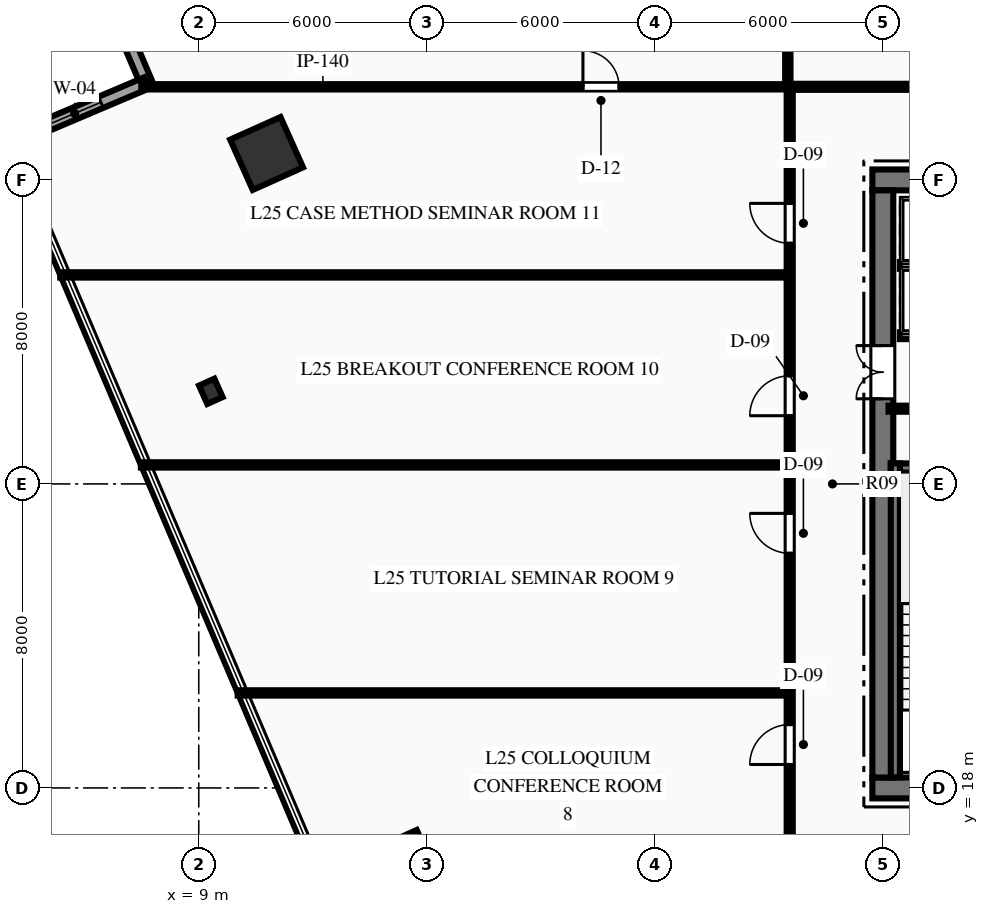
"""IFC4 building model, lengths in metres.
Left out: names, types, materials, properties, quantities, classifications, styles, units other than length and angle.
Written with IfcOpenShell. Run it as: python <this file> out.ifc"""

import sys

from ifc_helpers import new_model, si_unit, direction, frame, frame_2d, origin, origin_2d, place, context, subcontext, project, spatial, rectangle, hollow_rectangle, i_section, extrude, element, fill, save


model = new_model("IFC4")
c1 = context("Model", 3, precision=1e-05, world=origin(), true_north=direction((0.0, 1.0)))
c2 = subcontext(c1, "Body", "Model", "MODEL_VIEW")
j1 = project(units=[si_unit("LENGTHUNIT", "METRE"), si_unit("PLANEANGLEUNIT", "RADIAN")], contexts=[c1])
p1 = place(None, origin())
s1 = spatial("IfcSite", under=j1, at=p1, CompositionType="ELEMENT")
p2 = place(p1, origin())
s2 = spatial("IfcBuilding", under=s1, at=p2, CompositionType="ELEMENT")
p3 = place(p2, frame((0.0, 0.0, 105.45)))
s3 = spatial("IfcBuildingStorey", under=s2, at=p3, CompositionType="ELEMENT", Elevation=105.45)
p4 = place(p3, frame((26.725, 18.0, 0.0), z_axis=(0.0, 0.0, 1.0), x_axis=(1.0, 0.0, 0.0)))
e1 = element("IfcWall", 1, at=p4, inside=s3, PredefinedType="SHEAR", context=c2, shape_type="SweptSolid", body=[
    extrude(rectangle(XDim=18.55, YDim=0.55, at=frame_2d((9.275, 0.0))), origin(), (0.0, 0.0, 1.0), 3.75),
])
p5 = place(p4, frame((7.375, 0.0, 0.0)))
e2 = element("IfcOpeningElement", 2, at=p5, cuts=e1, PredefinedType="OPENING", context=c2, shape_type="SweptSolid", body=[
    extrude(rectangle(XDim=1.1, YDim=2.15, at=frame_2d((0.55, 1.075))), frame((0.0, 0.285, 0.0), z_axis=(0.0, -1.0, 0.0), x_axis=(1.0, 0.0, 0.0)), (0.0, 0.0, 1.0), 0.57),
])
p6 = place(p4, frame((10.075, 0.0, 0.0)))
e3 = element("IfcOpeningElement", 3, at=p6, cuts=e1, PredefinedType="OPENING", context=c2, shape_type="SweptSolid", body=[
    extrude(rectangle(XDim=1.1, YDim=2.15, at=frame_2d((0.55, 1.075))), frame((0.0, 0.285, 0.0), z_axis=(0.0, -1.0, 0.0), x_axis=(1.0, 0.0, 0.0)), (0.0, 0.0, 1.0), 0.57),
])
p7 = place(p3, frame((26.725, 34.0, 0.0), z_axis=(0.0, 0.0, 1.0), x_axis=(1.0, 0.0, 0.0)))
e4 = element("IfcWall", 4, at=p7, inside=s3, PredefinedType="SHEAR", context=c2, shape_type="SweptSolid", body=[
    extrude(rectangle(XDim=18.55, YDim=0.55, at=frame_2d((9.275, 0.0))), origin(), (0.0, 0.0, 1.0), 3.75),
])
p8 = place(p7, frame((1.24, 0.0, 0.0)))
e5 = element("IfcOpeningElement", 5, at=p8, cuts=e4, PredefinedType="OPENING", context=c2, shape_type="SweptSolid", body=[
    extrude(rectangle(XDim=1.1, YDim=2.15, at=frame_2d((0.55, 1.075))), frame((0.0, 0.285, 0.0), z_axis=(0.0, -1.0, 0.0), x_axis=(1.0, 0.0, 0.0)), (0.0, 0.0, 1.0), 0.57),
])
p9 = place(p7, frame((3.49, 0.0, 0.0)))
e6 = element("IfcOpeningElement", 6, at=p9, cuts=e4, PredefinedType="OPENING", context=c2, shape_type="SweptSolid", body=[
    extrude(rectangle(XDim=1.1, YDim=2.15, at=frame_2d((0.55, 1.075))), frame((0.0, 0.285, 0.0), z_axis=(0.0, -1.0, 0.0), x_axis=(1.0, 0.0, 0.0)), (0.0, 0.0, 1.0), 0.57),
])
p10 = place(p7, frame((13.96, 0.0, 0.0)))
e7 = element("IfcOpeningElement", 7, at=p10, cuts=e4, PredefinedType="OPENING", context=c2, shape_type="SweptSolid", body=[
    extrude(rectangle(XDim=1.1, YDim=2.15, at=frame_2d((0.55, 1.075))), frame((0.0, 0.285, 0.0), z_axis=(0.0, -1.0, 0.0), x_axis=(1.0, 0.0, 0.0)), (0.0, 0.0, 1.0), 0.57),
])
p11 = place(p7, frame((16.21, 0.0, 0.0)))
e8 = element("IfcOpeningElement", 8, at=p11, cuts=e4, PredefinedType="OPENING", context=c2, shape_type="SweptSolid", body=[
    extrude(rectangle(XDim=1.1, YDim=2.15, at=frame_2d((0.55, 1.075))), frame((0.0, 0.285, 0.0), z_axis=(0.0, -1.0, 0.0), x_axis=(1.0, 0.0, 0.0)), (0.0, 0.0, 1.0), 0.57),
])
p12 = place(p3, frame((27.0, 18.275, 0.0), z_axis=(0.0, 0.0, 1.0), x_axis=(0.0, 1.0, 0.0)))
e9 = element("IfcWall", 9, at=p12, inside=s3, PredefinedType="SHEAR", context=c2, shape_type="SweptSolid", body=[
    extrude(rectangle(XDim=15.45, YDim=0.55, at=frame_2d((7.725, 0.0))), origin(), (0.0, 0.0, 1.0), 3.75),
])
p13 = place(p12, frame((9.965, 0.0, 0.0)))
e10 = element("IfcOpeningElement", 10, at=p13, cuts=e9, PredefinedType="OPENING", context=c2, shape_type="SweptSolid", body=[
    extrude(rectangle(XDim=1.4, YDim=2.2, at=frame_2d((0.7, 1.1))), frame((0.0, 0.285, 0.0), z_axis=(0.0, -1.0, 0.0), x_axis=(1.0, 0.0, 0.0)), (0.0, 0.0, 1.0), 0.57),
])
p14 = place(p3, frame((27.21, 26.42, 0.0), z_axis=(0.0, 0.0, 1.0), x_axis=(1.0, 0.0, 0.0)))
e11 = element("IfcWall", 11, at=p14, inside=s3, PredefinedType="SHEAR", context=c2, shape_type="SweptSolid", body=[
    extrude(rectangle(XDim=3.98, YDim=0.24, at=frame_2d((1.99, 0.0))), origin(), (0.0, 0.0, 1.0), 3.75),
])
p15 = place(p3, frame((27.33, 18.28, 0.0), z_axis=(0.0, 0.0, 1.0), x_axis=(0.0, 1.0, 0.0)))
e12 = element("IfcWall", 12, at=p15, inside=s3, PredefinedType="SHEAR", context=c2, shape_type="SweptSolid", body=[
    extrude(rectangle(XDim=8.26, YDim=0.24, at=frame_2d((4.13, 0.0))), origin(), (0.0, 0.0, 1.0), 3.75),
])
p16 = place(p3, frame((10.786, 34.695, 0.0), z_axis=(0.0, 0.0, 1.0), x_axis=(0.912477494148, 0.409126902895, 0.0)))
e13 = element("IfcColumn", 13, at=p16, inside=s3, PredefinedType="COLUMN", context=c2, shape_type="SweptSolid", body=[
    extrude(hollow_rectangle(XDim=1.45, YDim=1.45, WallThickness=0.07, at=origin_2d()), origin(), (0.0, 0.0, 1.0), 3.75),
])
for number, where, z_axis, x_axis in (
    (14, (9.318, 28.437, 0.0), (0.0, 0.0, 1.0), (0.912, 0.409, 0.0)),
    (15, (14.643, 16.561, 0.0), (0.0, 0.0, 1.0), (0.912, 0.409, 0.0)),
):
    element("IfcColumn", number, at=place(p3, frame(where, z_axis=z_axis, x_axis=x_axis)), inside=s3, PredefinedType="COLUMN", context=c2, shape_type="SweptSolid", body=[
        extrude(i_section(OverallWidth=0.442, OverallDepth=0.531, WebThickness=0.066, FlangeThickness=0.106, at=origin_2d()), origin(), (0.0, 0.0, 1.0), 3.75),
    ])
p17 = place(p3, frame((7.622, 36.55, 0.0), z_axis=(0.0, 0.0, 1.0), x_axis=(-0.390682883444, 0.920525330767, 0.0)))
e16 = element("IfcWall", 16, at=p17, inside=s3, PredefinedType="STANDARD", context=c2, shape_type="SweptSolid", body=[
    extrude(rectangle(XDim=4.1, YDim=0.32, at=frame_2d((2.05, 0.0))), origin(), (0.0, 0.0, 1.0), 3.45),
])
p18 = place(p3, frame((3.848, 34.948, 0.0), z_axis=(0.0, 0.0, 1.0), x_axis=(0.920516241292, 0.390704299335, 0.0)))
e17 = element("IfcWall", 17, at=p18, inside=s3, PredefinedType="STANDARD", context=c2, shape_type="SweptSolid", body=[
    extrude(rectangle(XDim=4.1, YDim=0.32, at=frame_2d((2.05, 0.0))), origin(), (0.0, 0.0, 1.0), 3.45),
])
p19 = place(p18, frame((1.3, 0.0, 0.85)))
e18 = element("IfcOpeningElement", 18, at=p19, cuts=e17, PredefinedType="OPENING", context=c2, shape_type="SweptSolid", body=[
    extrude(rectangle(XDim=1.5, YDim=2.1, at=frame_2d((0.75, 1.05))), frame((0.0, 0.17, 0.0), z_axis=(0.0, -1.0, 0.0), x_axis=(1.0, 0.0, 0.0)), (0.0, 0.0, 1.0), 0.34),
])
p20 = place(p3, frame((27.15, 27.98, 0.0), z_axis=(0.0, 0.0, 1.0), x_axis=(1.0, 0.0, 0.0)))
e19 = element("IfcWall", 19, at=p20, inside=s3, PredefinedType="PARTITIONING", context=c2, shape_type="SweptSolid", body=[
    extrude(rectangle(XDim=4.05, YDim=0.16, at=frame_2d((2.025, 0.0))), origin(), (0.0, 0.0, 1.0), 3.45),
])
p21 = place(p20, frame((1.625, 0.0, 0.0)))
e20 = element("IfcOpeningElement", 20, at=p21, cuts=e19, PredefinedType="OPENING", context=c2, shape_type="SweptSolid", body=[
    extrude(rectangle(XDim=0.95, YDim=2.15, at=frame_2d((0.475, 1.075))), frame((0.0, 0.09, 0.0), z_axis=(0.0, -1.0, 0.0), x_axis=(1.0, 0.0, 0.0)), (0.0, 0.0, 1.0), 0.18),
])
p22 = place(p3, frame((27.45, 29.9, 0.0), z_axis=(0.0, 0.0, 1.0), x_axis=(1.0, 0.0, 0.0)))
e21 = element("IfcWall", 21, at=p22, inside=s3, PredefinedType="PARTITIONING", context=c2, shape_type="SweptSolid", body=[
    extrude(rectangle(XDim=4.43, YDim=0.18, at=frame_2d((2.215, 0.0))), origin(), (0.0, 0.0, 1.0), 3.45),
])
p23 = place(p22, frame((0.515, 0.0, 0.0)))
e22 = element("IfcOpeningElement", 22, at=p23, cuts=e21, PredefinedType="OPENING", context=c2, shape_type="SweptSolid", body=[
    extrude(rectangle(XDim=1.1, YDim=2.15, at=frame_2d((0.55, 1.075))), frame((0.0, 0.1, 0.0), z_axis=(0.0, -1.0, 0.0), x_axis=(1.0, 0.0, 0.0)), (0.0, 0.0, 1.0), 0.2),
])
p24 = place(p22, frame((2.765, 0.0, 0.0)))
e23 = element("IfcOpeningElement", 23, at=p24, cuts=e21, PredefinedType="OPENING", context=c2, shape_type="SweptSolid", body=[
    extrude(rectangle(XDim=1.1, YDim=2.15, at=frame_2d((0.55, 1.075))), frame((0.0, 0.1, 0.0), z_axis=(0.0, -1.0, 0.0), x_axis=(1.0, 0.0, 0.0)), (0.0, 0.0, 1.0), 0.2),
])
p25 = place(p3, frame((27.45, 31.75, 0.0), z_axis=(0.0, 0.0, 1.0), x_axis=(1.0, 0.0, 0.0)))
e24 = element("IfcWall", 24, at=p25, inside=s3, PredefinedType="PARTITIONING", context=c2, shape_type="SweptSolid", body=[
    extrude(rectangle(XDim=4.43, YDim=0.18, at=frame_2d((2.215, 0.0))), origin(), (0.0, 0.0, 1.0), 3.45),
])
p26 = place(p3, frame((24.5, 36.45, 0.0), z_axis=(0.0, 0.0, 1.0), x_axis=(1.0, 0.0, 0.0)))
e25 = element("IfcWall", 25, at=p26, inside=s3, PredefinedType="PARTITIONING", context=c2, shape_type="SweptSolid", body=[
    extrude(rectangle(XDim=23.0, YDim=0.16, at=frame_2d((11.5, 0.0))), origin(), (0.0, 0.0, 1.0), 3.45),
])
p27 = place(p26, frame((7.521, 0.0, 0.0)))
e26 = element("IfcOpeningElement", 26, at=p27, cuts=e25, PredefinedType="OPENING", context=c2, shape_type="SweptSolid", body=[
    extrude(rectangle(XDim=1.05, YDim=2.15, at=frame_2d((0.525, 1.075))), frame((0.0, 0.09, 0.0), z_axis=(0.0, -1.0, 0.0), x_axis=(1.0, 0.0, 0.0)), (0.0, 0.0, 1.0), 0.18),
])
p28 = place(p26, frame((14.375, 0.0, 0.0)))
e27 = element("IfcOpeningElement", 27, at=p28, cuts=e25, PredefinedType="OPENING", context=c2, shape_type="SweptSolid", body=[
    extrude(rectangle(XDim=1.05, YDim=2.15, at=frame_2d((0.525, 1.075))), frame((0.0, 0.09, 0.0), z_axis=(0.0, -1.0, 0.0), x_axis=(1.0, 0.0, 0.0)), (0.0, 0.0, 1.0), 0.18),
])
p29 = place(p3, frame((24.55, 15.55, 0.0), z_axis=(0.0, 0.0, 1.0), x_axis=(0.0, 1.0, 0.0)))
e28 = element("IfcWall", 28, at=p29, inside=s3, PredefinedType="PARTITIONING", context=c2, shape_type="SweptSolid", body=[
    extrude(rectangle(XDim=20.9, YDim=0.16, at=frame_2d((10.45, 0.0))), origin(), (0.0, 0.0, 1.0), 3.45),
])
p30 = place(p29, frame((3.067, 0.0, 0.0)))
e29 = element("IfcOpeningElement", 29, at=p30, cuts=e28, PredefinedType="OPENING", context=c2, shape_type="SweptSolid", body=[
    extrude(rectangle(XDim=1.05, YDim=2.15, at=frame_2d((0.525, 1.075))), frame((0.0, 0.09, 0.0), z_axis=(0.0, -1.0, 0.0), x_axis=(1.0, 0.0, 0.0)), (0.0, 0.0, 1.0), 0.18),
])
p31 = place(p29, frame((8.625, 0.0, 0.0)))
e30 = element("IfcOpeningElement", 30, at=p31, cuts=e28, PredefinedType="OPENING", context=c2, shape_type="SweptSolid", body=[
    extrude(rectangle(XDim=1.05, YDim=2.15, at=frame_2d((0.525, 1.075))), frame((0.0, 0.09, 0.0), z_axis=(0.0, -1.0, 0.0), x_axis=(1.0, 0.0, 0.0)), (0.0, 0.0, 1.0), 0.18),
])
p32 = place(p29, frame((12.245, 0.0, 0.0)))
e31 = element("IfcOpeningElement", 31, at=p32, cuts=e28, PredefinedType="OPENING", context=c2, shape_type="SweptSolid", body=[
    extrude(rectangle(XDim=1.05, YDim=2.15, at=frame_2d((0.525, 1.075))), frame((0.0, 0.09, 0.0), z_axis=(0.0, -1.0, 0.0), x_axis=(1.0, 0.0, 0.0)), (0.0, 0.0, 1.0), 0.18),
])
p33 = place(p29, frame((16.783, 0.0, 0.0)))
e32 = element("IfcOpeningElement", 32, at=p33, cuts=e28, PredefinedType="OPENING", context=c2, shape_type="SweptSolid", body=[
    extrude(rectangle(XDim=1.05, YDim=2.15, at=frame_2d((0.525, 1.075))), frame((0.0, 0.09, 0.0), z_axis=(0.0, -1.0, 0.0), x_axis=(1.0, 0.0, 0.0)), (0.0, 0.0, 1.0), 0.18),
])
p34 = place(p3, frame((7.488, 36.45, 0.0), z_axis=(0.0, 0.0, 1.0), x_axis=(1.0, 0.0, 0.0)))
e33 = element("IfcWall", 33, at=p34, inside=s3, PredefinedType="PARTITIONING", context=c2, shape_type="SweptSolid", body=[
    extrude(rectangle(XDim=17.062, YDim=0.14, at=frame_2d((8.531, 0.0))), origin(), (0.0, 0.0, 1.0), 3.45),
])
p35 = place(p34, frame((11.622, 0.0, 0.0)))
e34 = element("IfcOpeningElement", 34, at=p35, cuts=e33, PredefinedType="OPENING", context=c2, shape_type="SweptSolid", body=[
    extrude(rectangle(XDim=0.95, YDim=2.15, at=frame_2d((0.475, 1.075))), frame((0.0, 0.08, 0.0), z_axis=(0.0, -1.0, 0.0), x_axis=(1.0, 0.0, 0.0)), (0.0, 0.0, 1.0), 0.16),
])
p36 = place(p3, frame((24.5, 36.45, 0.0), z_axis=(0.0, 0.0, 1.0), x_axis=(0.0, 1.0, 0.0)))
e35 = element("IfcWall", 35, at=p36, inside=s3, PredefinedType="PARTITIONING", context=c2, shape_type="SweptSolid", body=[
    extrude(rectangle(XDim=11.676, YDim=0.14, at=frame_2d((5.838, 0.0))), origin(), (0.0, 0.0, 1.0), 3.45),
])
p37 = place(p3, frame((10.024, 20.5, 0.0), z_axis=(0.0, 0.0, 1.0), x_axis=(1.0, 0.0, 0.0)))
e36 = element("IfcWall", 36, at=p37, inside=s3, PredefinedType="PARTITIONING", context=c2, shape_type="SweptSolid", body=[
    extrude(rectangle(XDim=14.526, YDim=0.14, at=frame_2d((7.263, 0.0))), origin(), (0.0, 0.0, 1.0), 3.45),
])
p38 = place(p3, frame((7.477, 26.5, 0.0), z_axis=(0.0, 0.0, 1.0), x_axis=(1.0, 0.0, 0.0)))
e37 = element("IfcWall", 37, at=p38, inside=s3, PredefinedType="PARTITIONING", context=c2, shape_type="SweptSolid", body=[
    extrude(rectangle(XDim=17.073, YDim=0.14, at=frame_2d((8.536, 0.0))), origin(), (0.0, 0.0, 1.0), 3.45),
])
p39 = place(p3, frame((5.355, 31.5, 0.0), z_axis=(0.0, 0.0, 1.0), x_axis=(1.0, 0.0, 0.0)))
e38 = element("IfcWall", 38, at=p39, inside=s3, PredefinedType="PARTITIONING", context=c2, shape_type="SweptSolid", body=[
    extrude(rectangle(XDim=19.195, YDim=0.14, at=frame_2d((9.598, 0.0))), origin(), (0.0, 0.0, 1.0), 3.45),
])
p40 = place(p19, origin())
e39 = element("IfcWindow", 39, at=p40, inside=s3, PartitioningType="SINGLE_PANEL", PredefinedType="WINDOW", context=c2, shape_type="SweptSolid", body=[
    extrude(rectangle(XDim=1.5, YDim=2.1, at=frame_2d((0.75, 1.05))), frame((0.0, 0.03, 0.0), z_axis=(0.0, -1.0, 0.0), x_axis=(1.0, 0.0, 0.0)), (0.0, 0.0, 1.0), 0.06),
])
fill(e18, e39)
p41 = place(p13, origin())
e40 = element("IfcDoor", 40, at=p41, inside=s3, OperationType="DOUBLE_DOOR_SINGLE_SWING", PredefinedType="DOOR", context=c2, shape_type="SweptSolid", body=[
    extrude(rectangle(XDim=1.4, YDim=2.2, at=frame_2d((0.7, 1.1))), frame((0.0, 0.025, 0.0), z_axis=(0.0, -1.0, 0.0), x_axis=(1.0, 0.0, 0.0)), (0.0, 0.0, 1.0), 0.05),
])
fill(e10, e40)
p42 = place(p35, origin())
e41 = element("IfcDoor", 41, at=p42, inside=s3, OperationType="SINGLE_SWING_LEFT", PredefinedType="DOOR", context=c2, shape_type="SweptSolid", body=[
    extrude(rectangle(XDim=0.95, YDim=2.15, at=frame_2d((0.475, 1.075))), frame((0.0, 0.025, 0.0), z_axis=(0.0, -1.0, 0.0), x_axis=(1.0, 0.0, 0.0)), (0.0, 0.0, 1.0), 0.05),
])
fill(e34, e41)
p43 = place(p30, origin())
e42 = element("IfcDoor", 42, at=p43, inside=s3, OperationType="SINGLE_SWING_LEFT", PredefinedType="DOOR", context=c2, shape_type="SweptSolid", body=[
    extrude(rectangle(XDim=1.05, YDim=2.15, at=frame_2d((0.525, 1.075))), frame((0.0, 0.025, 0.0), z_axis=(0.0, -1.0, 0.0), x_axis=(1.0, 0.0, 0.0)), (0.0, 0.0, 1.0), 0.05),
])
fill(e29, e42)
p44 = place(p31, origin())
e43 = element("IfcDoor", 43, at=p44, inside=s3, OperationType="SINGLE_SWING_RIGHT", PredefinedType="DOOR", context=c2, shape_type="SweptSolid", body=[
    extrude(rectangle(XDim=1.05, YDim=2.15, at=frame_2d((0.525, 1.075))), frame((0.0, 0.025, 0.0), z_axis=(0.0, -1.0, 0.0), x_axis=(1.0, 0.0, 0.0)), (0.0, 0.0, 1.0), 0.05),
])
fill(e30, e43)
p45 = place(p32, origin())
e44 = element("IfcDoor", 44, at=p45, inside=s3, OperationType="SINGLE_SWING_LEFT", PredefinedType="DOOR", context=c2, shape_type="SweptSolid", body=[
    extrude(rectangle(XDim=1.05, YDim=2.15, at=frame_2d((0.525, 1.075))), frame((0.0, 0.025, 0.0), z_axis=(0.0, -1.0, 0.0), x_axis=(1.0, 0.0, 0.0)), (0.0, 0.0, 1.0), 0.05),
])
fill(e31, e44)
p46 = place(p33, origin())
e45 = element("IfcDoor", 45, at=p46, inside=s3, OperationType="SINGLE_SWING_RIGHT", PredefinedType="DOOR", context=c2, shape_type="SweptSolid", body=[
    extrude(rectangle(XDim=1.05, YDim=2.15, at=frame_2d((0.525, 1.075))), frame((0.0, 0.025, 0.0), z_axis=(0.0, -1.0, 0.0), x_axis=(1.0, 0.0, 0.0)), (0.0, 0.0, 1.0), 0.05),
])
fill(e32, e45)
save(model, sys.argv[1])
